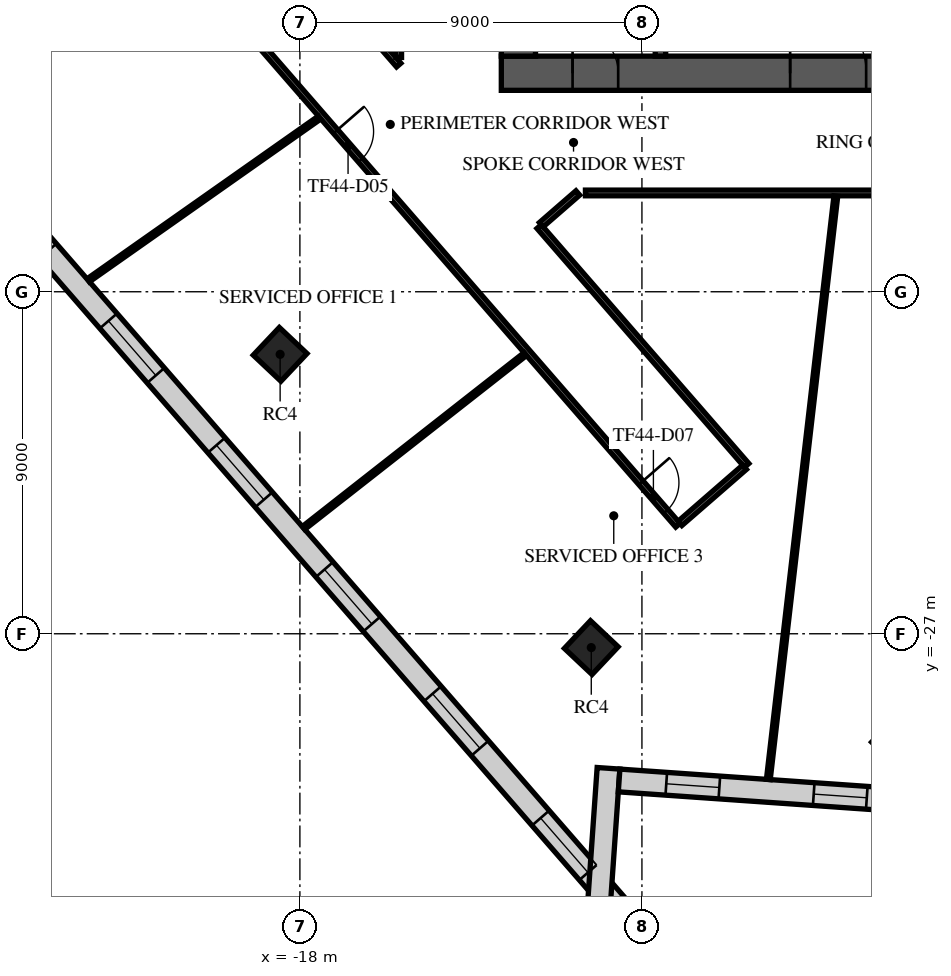
"""IFC4 building model, lengths in metres.
Left out: names, types, materials, properties, quantities, classifications, styles, units other than length and angle.
Written with IfcOpenShell. Run it as: python <this file> out.ifc"""

import sys

from ifc_helpers import new_model, si_unit, direction, frame, frame_2d, origin, origin_2d, place, context, subcontext, project, spatial, rectangle, extrude, element, fill, save


model = new_model("IFC4")
c1 = context("Model", 3, precision=1e-05, world=origin(), true_north=direction((0.0, 1.0)))
c2 = subcontext(c1, "Body", "Model", "MODEL_VIEW")
j1 = project(units=[si_unit("LENGTHUNIT", "METRE"), si_unit("PLANEANGLEUNIT", "RADIAN")], contexts=[c1])
p1 = place(None, origin())
s1 = spatial("IfcSite", under=j1, at=p1, CompositionType="ELEMENT")
p2 = place(p1, origin())
s2 = spatial("IfcBuilding", under=s1, at=p2, CompositionType="ELEMENT")
p3 = place(p2, frame((0.0, 0.0, 193.3)))
s3 = spatial("IfcBuildingStorey", under=s2, at=p3, CompositionType="ELEMENT", Elevation=193.3)
for number, where, z_axis, x_axis in (
    (1, (-18.52, -19.647, 0.0), (0.0, 0.0, 1.0), (0.686, 0.728, 0.0)),
    (2, (-10.333, -27.364, 0.0), (0.0, 0.0, 1.0), (0.686, 0.728, 0.0)),
):
    element("IfcColumn", number, at=place(p3, frame(where, z_axis=z_axis, x_axis=x_axis)), inside=s3, PredefinedType="COLUMN", context=c2, shape_type="SweptSolid", body=[
        extrude(rectangle(XDim=1.0, YDim=1.0, at=origin_2d()), origin(), (0.0, 0.0, 1.0), 4.0),
    ])
p4 = place(p3, frame((-12.7, -12.25, 0.0), z_axis=(0.0, 0.0, 1.0), x_axis=(1.0, 0.0, 0.0)))
e3 = element("IfcWall", 3, at=p4, inside=s3, PredefinedType="SHEAR", context=c2, shape_type="SweptSolid", body=[
    extrude(rectangle(XDim=25.4, YDim=0.9, at=frame_2d((12.7, 0.0))), origin(), (0.0, 0.0, 1.0), 3.62),
])
p5 = place(p4, frame((7.6, 0.0, 0.0)))
e4 = element("IfcOpeningElement", 4, at=p5, cuts=e3, PredefinedType="OPENING", context=c2, shape_type="SweptSolid", body=[
    extrude(rectangle(XDim=2.0, YDim=2.1, at=frame_2d((1.0, 1.05))), frame((0.0, 0.46, 0.0), z_axis=(0.0, -1.0, 0.0), x_axis=(1.0, 0.0, 0.0)), (0.0, 0.0, 1.0), 0.92),
])
p6 = place(p4, frame((17.725, 0.0, 0.0)))
e5 = element("IfcOpeningElement", 5, at=p6, cuts=e3, PredefinedType="OPENING", context=c2, shape_type="SweptSolid", body=[
    extrude(rectangle(XDim=1.2, YDim=2.1, at=frame_2d((0.6, 1.05))), frame((0.0, 0.46, 0.0), z_axis=(0.0, -1.0, 0.0), x_axis=(1.0, 0.0, 0.0)), (0.0, 0.0, 1.0), 0.92),
])
p7 = place(p4, frame((1.875, 0.0, 0.0)))
e6 = element("IfcOpeningElement", 6, at=p7, cuts=e3, PredefinedType="OPENING", context=c2, shape_type="SweptSolid", body=[
    extrude(rectangle(XDim=1.2, YDim=2.1, at=frame_2d((0.6, 1.05))), frame((0.0, 0.46, 0.0), z_axis=(0.0, -1.0, 0.0), x_axis=(1.0, 0.0, 0.0)), (0.0, 0.0, 1.0), 0.92),
])
p8 = place(p4, frame((22.325, 0.0, 0.0)))
e7 = element("IfcOpeningElement", 7, at=p8, cuts=e3, PredefinedType="OPENING", context=c2, shape_type="SweptSolid", body=[
    extrude(rectangle(XDim=1.2, YDim=2.1, at=frame_2d((0.6, 1.05))), frame((0.0, 0.46, 0.0), z_axis=(0.0, -1.0, 0.0), x_axis=(1.0, 0.0, 0.0)), (0.0, 0.0, 1.0), 0.92),
])
p9 = place(p3, frame((-12.25, -11.8, 0.0), z_axis=(0.0, 0.0, 1.0), x_axis=(0.0, 1.0, 0.0)))
e8 = element("IfcWall", 8, at=p9, inside=s3, PredefinedType="SHEAR", context=c2, shape_type="SweptSolid", body=[
    extrude(rectangle(XDim=23.6, YDim=0.9, at=frame_2d((11.8, 0.0))), origin(), (0.0, 0.0, 1.0), 3.62),
])
p10 = place(p9, frame((10.6, 0.0, 0.0)))
e9 = element("IfcOpeningElement", 9, at=p10, cuts=e8, PredefinedType="OPENING", context=c2, shape_type="SweptSolid", body=[
    extrude(rectangle(XDim=2.4, YDim=2.4, at=frame_2d((1.2, 1.2))), frame((0.0, 0.46, 0.0), z_axis=(0.0, -1.0, 0.0), x_axis=(1.0, 0.0, 0.0)), (0.0, 0.0, 1.0), 0.92),
])
p11 = place(p3, frame((-8.512, -4.55, 0.0), z_axis=(0.0, 0.0, 1.0), x_axis=(0.0, -1.0, 0.0)))
e10 = element("IfcWall", 10, at=p11, inside=s3, PredefinedType="SOLIDWALL", context=c2, shape_type="SweptSolid", body=[
    extrude(rectangle(XDim=7.25, YDim=0.275, at=frame_2d((3.625, 0.0))), origin(), (0.0, 0.0, 1.0), 3.62),
])
p12 = place(p11, frame((6.0, 0.0, 0.0)))
e11 = element("IfcOpeningElement", 11, at=p12, cuts=e10, PredefinedType="OPENING", context=c2, shape_type="SweptSolid", body=[
    extrude(rectangle(XDim=1.0, YDim=2.1, at=frame_2d((0.5, 1.05))), frame((0.0, 0.147, 0.0), z_axis=(0.0, -1.0, 0.0), x_axis=(1.0, 0.0, 0.0)), (0.0, 0.0, 1.0), 0.295),
])
p13 = place(p3, frame((-35.208, -4.768, 0.0), z_axis=(0.0, 0.0, 1.0), x_axis=(0.656058749455, -0.754709823219, 0.0)))
e12 = element("IfcWall", 12, at=p13, inside=s3, PredefinedType="STANDARD", context=c2, shape_type="SweptSolid", body=[
    extrude(rectangle(XDim=39.0, YDim=0.6, at=frame_2d((19.5, 0.0))), origin(), (0.0, 0.0, 1.0), 3.62),
])
p14 = place(p13, frame((1.217, 0.0, 0.9)))
e13 = element("IfcOpeningElement", 13, at=p14, cuts=e12, PredefinedType="OPENING", context=c2, shape_type="SweptSolid", body=[
    extrude(rectangle(XDim=1.9, YDim=2.1, at=frame_2d((0.95, 1.05))), frame((0.0, 0.31, 0.0), z_axis=(0.0, -1.0, 0.0), x_axis=(1.0, 0.0, 0.0)), (0.0, 0.0, 1.0), 0.62),
])
p15 = place(p13, frame((5.55, 0.0, 0.9)))
e14 = element("IfcOpeningElement", 14, at=p15, cuts=e12, PredefinedType="OPENING", context=c2, shape_type="SweptSolid", body=[
    extrude(rectangle(XDim=1.9, YDim=2.1, at=frame_2d((0.95, 1.05))), frame((0.0, 0.31, 0.0), z_axis=(0.0, -1.0, 0.0), x_axis=(1.0, 0.0, 0.0)), (0.0, 0.0, 1.0), 0.62),
])
p16 = place(p13, frame((9.883, 0.0, 0.9)))
e15 = element("IfcOpeningElement", 15, at=p16, cuts=e12, PredefinedType="OPENING", context=c2, shape_type="SweptSolid", body=[
    extrude(rectangle(XDim=1.9, YDim=2.1, at=frame_2d((0.95, 1.05))), frame((0.0, 0.31, 0.0), z_axis=(0.0, -1.0, 0.0), x_axis=(1.0, 0.0, 0.0)), (0.0, 0.0, 1.0), 0.62),
])
p17 = place(p13, frame((14.217, 0.0, 0.9)))
e16 = element("IfcOpeningElement", 16, at=p17, cuts=e12, PredefinedType="OPENING", context=c2, shape_type="SweptSolid", body=[
    extrude(rectangle(XDim=1.9, YDim=2.1, at=frame_2d((0.95, 1.05))), frame((0.0, 0.31, 0.0), z_axis=(0.0, -1.0, 0.0), x_axis=(1.0, 0.0, 0.0)), (0.0, 0.0, 1.0), 0.62),
])
p18 = place(p13, frame((18.55, 0.0, 0.9)))
e17 = element("IfcOpeningElement", 17, at=p18, cuts=e12, PredefinedType="OPENING", context=c2, shape_type="SweptSolid", body=[
    extrude(rectangle(XDim=1.9, YDim=2.1, at=frame_2d((0.95, 1.05))), frame((0.0, 0.31, 0.0), z_axis=(0.0, -1.0, 0.0), x_axis=(1.0, 0.0, 0.0)), (0.0, 0.0, 1.0), 0.62),
])
p19 = place(p13, frame((22.883, 0.0, 0.9)))
e18 = element("IfcOpeningElement", 18, at=p19, cuts=e12, PredefinedType="OPENING", context=c2, shape_type="SweptSolid", body=[
    extrude(rectangle(XDim=1.9, YDim=2.1, at=frame_2d((0.95, 1.05))), frame((0.0, 0.31, 0.0), z_axis=(0.0, -1.0, 0.0), x_axis=(1.0, 0.0, 0.0)), (0.0, 0.0, 1.0), 0.62),
])
p20 = place(p13, frame((27.217, 0.0, 0.9)))
e19 = element("IfcOpeningElement", 19, at=p20, cuts=e12, PredefinedType="OPENING", context=c2, shape_type="SweptSolid", body=[
    extrude(rectangle(XDim=1.9, YDim=2.1, at=frame_2d((0.95, 1.05))), frame((0.0, 0.31, 0.0), z_axis=(0.0, -1.0, 0.0), x_axis=(1.0, 0.0, 0.0)), (0.0, 0.0, 1.0), 0.62),
])
p21 = place(p13, frame((31.55, 0.0, 0.9)))
e20 = element("IfcOpeningElement", 20, at=p21, cuts=e12, PredefinedType="OPENING", context=c2, shape_type="SweptSolid", body=[
    extrude(rectangle(XDim=1.9, YDim=2.1, at=frame_2d((0.95, 1.05))), frame((0.0, 0.31, 0.0), z_axis=(0.0, -1.0, 0.0), x_axis=(1.0, 0.0, 0.0)), (0.0, 0.0, 1.0), 0.62),
])
p22 = place(p13, frame((35.883, 0.0, 0.9)))
e21 = element("IfcOpeningElement", 21, at=p22, cuts=e12, PredefinedType="OPENING", context=c2, shape_type="SweptSolid", body=[
    extrude(rectangle(XDim=1.9, YDim=2.1, at=frame_2d((0.95, 1.05))), frame((0.0, 0.31, 0.0), z_axis=(0.0, -1.0, 0.0), x_axis=(1.0, 0.0, 0.0)), (0.0, 0.0, 1.0), 0.62),
])
p23 = place(p3, frame((-10.147, -34.378, 0.0), z_axis=(0.0, 0.0, 1.0), x_axis=(0.069753966021, 0.997564225614, 0.0)))
e22 = element("IfcWall", 22, at=p23, inside=s3, PredefinedType="STANDARD", context=c2, shape_type="SweptSolid", body=[
    extrude(rectangle(XDim=3.846, YDim=0.6, at=frame_2d((1.923, 0.0))), origin(), (0.0, 0.0, 1.0), 3.62),
])
p24 = place(p3, frame((-9.601, -30.861, 0.0), z_axis=(0.0, 0.0, 1.0), x_axis=(0.997564801601, -0.069745728239, 0.0)))
e23 = element("IfcWall", 23, at=p24, inside=s3, PredefinedType="STANDARD", context=c2, shape_type="SweptSolid", body=[
    extrude(rectangle(XDim=7.778, YDim=0.6, at=frame_2d((3.889, 0.0))), origin(), (0.0, 0.0, 1.0), 3.62),
])
p25 = place(p24, frame((1.244, 0.0, 0.9)))
e24 = element("IfcOpeningElement", 24, at=p25, cuts=e23, PredefinedType="OPENING", context=c2, shape_type="SweptSolid", body=[
    extrude(rectangle(XDim=1.4, YDim=2.1, at=frame_2d((0.7, 1.05))), frame((0.0, 0.31, 0.0), z_axis=(0.0, -1.0, 0.0), x_axis=(1.0, 0.0, 0.0)), (0.0, 0.0, 1.0), 0.62),
])
p26 = place(p24, frame((5.134, 0.0, 0.9)))
e25 = element("IfcOpeningElement", 25, at=p26, cuts=e23, PredefinedType="OPENING", context=c2, shape_type="SweptSolid", body=[
    extrude(rectangle(XDim=1.4, YDim=2.1, at=frame_2d((0.7, 1.05))), frame((0.0, 0.31, 0.0), z_axis=(0.0, -1.0, 0.0), x_axis=(1.0, 0.0, 0.0)), (0.0, 0.0, 1.0), 0.62),
])
p27 = place(p3, frame((-24.98, -4.673, 0.0), z_axis=(0.0, 0.0, 1.0), x_axis=(0.656048444225, -0.754718781289, 0.0)))
e26 = element("IfcWall", 26, at=p27, inside=s3, PredefinedType="PARTITIONING", context=c2, shape_type="SweptSolid", body=[
    extrude(rectangle(XDim=25.8, YDim=0.15, at=frame_2d((12.9, 0.0))), origin(), (0.0, 0.0, 1.0), 3.17),
])
p28 = place(p27, frame((12.071, 0.0, 0.0)))
e27 = element("IfcOpeningElement", 27, at=p28, cuts=e26, PredefinedType="OPENING", context=c2, shape_type="SweptSolid", body=[
    extrude(rectangle(XDim=1.0, YDim=2.1, at=frame_2d((0.5, 1.05))), frame((0.0, 0.085, 0.0), z_axis=(0.0, -1.0, 0.0), x_axis=(1.0, 0.0, 0.0)), (0.0, 0.0, 1.0), 0.17),
])
p29 = place(p27, frame((24.318, 0.0, 0.0)))
e28 = element("IfcOpeningElement", 28, at=p29, cuts=e26, PredefinedType="OPENING", context=c2, shape_type="SweptSolid", body=[
    extrude(rectangle(XDim=1.0, YDim=2.1, at=frame_2d((0.5, 1.05))), frame((0.0, 0.085, 0.0), z_axis=(0.0, -1.0, 0.0), x_axis=(1.0, 0.0, 0.0)), (0.0, 0.0, 1.0), 0.17),
])
p30 = place(p3, frame((-23.169, -3.098, 0.0), z_axis=(0.0, 0.0, 1.0), x_axis=(0.656047525283, -0.754719580089, 0.0)))
e29 = element("IfcWall", 29, at=p30, inside=s3, PredefinedType="PARTITIONING", context=c2, shape_type="SweptSolid", body=[
    extrude(rectangle(XDim=11.842, YDim=0.15, at=frame_2d((5.921, 0.0))), origin(), (0.0, 0.0, 1.0), 3.17),
])
p31 = place(p30, frame((2.8, 0.0, 0.0)))
e30 = element("IfcOpeningElement", 30, at=p31, cuts=e29, PredefinedType="OPENING", context=c2, shape_type="SweptSolid", body=[
    extrude(rectangle(XDim=1.8, YDim=2.1, at=frame_2d((0.9, 1.05))), frame((0.0, 0.085, 0.0), z_axis=(0.0, -1.0, 0.0), x_axis=(1.0, 0.0, 0.0)), (0.0, 0.0, 1.0), 0.17),
])
p32 = place(p30, frame((7.55, 0.0, 0.0)))
e31 = element("IfcOpeningElement", 31, at=p32, cuts=e29, PredefinedType="OPENING", context=c2, shape_type="SweptSolid", body=[
    extrude(rectangle(XDim=1.0, YDim=2.1, at=frame_2d((0.5, 1.05))), frame((0.0, 0.085, 0.0), z_axis=(0.0, -1.0, 0.0), x_axis=(1.0, 0.0, 0.0)), (0.0, 0.0, 1.0), 0.17),
])
p33 = place(p3, frame((-15.4, -11.834, 0.0), z_axis=(0.0, 0.0, 1.0), x_axis=(0.0, 1.0, 0.0)))
e32 = element("IfcWall", 32, at=p33, inside=s3, PredefinedType="PARTITIONING", context=c2, shape_type="SweptSolid", body=[
    extrude(rectangle(XDim=20.666, YDim=0.15, at=frame_2d((10.333, 0.0))), origin(), (0.0, 0.0, 1.0), 3.17),
])
p34 = place(p3, frame((-11.705, -16.285, 0.0), z_axis=(0.0, 0.0, 1.0), x_axis=(0.656018266208, -0.754745012837, 0.0)))
e33 = element("IfcWall", 33, at=p34, inside=s3, PredefinedType="PARTITIONING", context=c2, shape_type="SweptSolid", body=[
    extrude(rectangle(XDim=8.326, YDim=0.15, at=frame_2d((4.163, 0.0))), origin(), (0.0, 0.0, 1.0), 3.17),
])
p35 = place(p3, frame((-11.648, -16.236, 0.0), z_axis=(0.0, 0.0, 1.0), x_axis=(0.754638525281, 0.656140759412, 0.0)))
e34 = element("IfcWall", 34, at=p35, inside=s3, PredefinedType="PARTITIONING", context=c2, shape_type="SweptSolid", body=[
    extrude(rectangle(XDim=1.274, YDim=0.15, at=frame_2d((0.637, 0.0))), origin(), (0.0, 0.0, 1.0), 3.17),
])
p36 = place(p3, frame((-10.486, -15.4, 0.0), z_axis=(0.0, 0.0, 1.0), x_axis=(1.0, 0.0, 0.0)))
e35 = element("IfcWall", 35, at=p36, inside=s3, PredefinedType="PARTITIONING", context=c2, shape_type="SweptSolid", body=[
    extrude(rectangle(XDim=17.763, YDim=0.15, at=frame_2d((8.882, 0.0))), origin(), (0.0, 0.0, 1.0), 3.17),
])
p37 = place(p36, frame((14.154, 0.0, 0.0)))
e36 = element("IfcOpeningElement", 36, at=p37, cuts=e35, PredefinedType="OPENING", context=c2, shape_type="SweptSolid", body=[
    extrude(rectangle(XDim=1.0, YDim=2.1, at=frame_2d((0.5, 1.05))), frame((0.0, 0.085, 0.0), z_axis=(0.0, -1.0, 0.0), x_axis=(1.0, 0.0, 0.0)), (0.0, 0.0, 1.0), 0.17),
])
p38 = place(p3, frame((-7.997, -24.095, 0.0), z_axis=(0.0, 0.0, 1.0), x_axis=(0.754549456123, 0.656243185308, 0.0)))
e37 = element("IfcWall", 37, at=p38, inside=s3, PredefinedType="PARTITIONING", context=c2, shape_type="SweptSolid", body=[
    extrude(rectangle(XDim=2.25, YDim=0.15, at=frame_2d((1.125, 0.0))), origin(), (0.0, 0.0, 1.0), 3.17),
])
p39 = place(p3, frame((-23.568, -17.698, 0.0), z_axis=(0.0, 0.0, 1.0), x_axis=(0.817824726915, 0.575467389212, 0.0)))
e38 = element("IfcWall", 38, at=p39, inside=s3, PredefinedType="PARTITIONING", context=c2, shape_type="SweptSolid", body=[
    extrude(rectangle(XDim=7.438, YDim=0.1, at=frame_2d((3.719, 0.0))), origin(), (0.0, 0.0, 1.0), 3.17),
])
p40 = place(p3, frame((-17.903, -24.215, 0.0), z_axis=(0.0, 0.0, 1.0), x_axis=(0.786835853262, 0.617162328744, 0.0)))
e39 = element("IfcWall", 39, at=p40, inside=s3, PredefinedType="PARTITIONING", context=c2, shape_type="SweptSolid", body=[
    extrude(rectangle(XDim=7.412, YDim=0.1, at=frame_2d((3.706, 0.0))), origin(), (0.0, 0.0, 1.0), 3.17),
])
p41 = place(p3, frame((-5.674, -30.833, 0.0), z_axis=(0.0, 0.0, 1.0), x_axis=(0.114957483757, 0.993370412751, 0.0)))
e40 = element("IfcWall", 40, at=p41, inside=s3, PredefinedType="PARTITIONING", context=c2, shape_type="SweptSolid", body=[
    extrude(rectangle(XDim=15.455, YDim=0.1, at=frame_2d((7.727, 0.0))), origin(), (0.0, 0.0, 1.0), 3.62),
])
p42 = place(p5, origin())
e41 = element("IfcDoor", 41, at=p42, inside=s3, OperationType="SINGLE_SWING_LEFT", PredefinedType="DOOR", context=c2, shape_type="SweptSolid", body=[
    extrude(rectangle(XDim=2.0, YDim=2.1, at=frame_2d((1.0, 1.05))), frame((0.0, 0.025, 0.0), z_axis=(0.0, -1.0, 0.0), x_axis=(1.0, 0.0, 0.0)), (0.0, 0.0, 1.0), 0.05),
])
fill(e4, e41)
p43 = place(p7, origin())
e42 = element("IfcDoor", 42, at=p43, inside=s3, OperationType="SINGLE_SWING_LEFT", PredefinedType="DOOR", context=c2, shape_type="SweptSolid", body=[
    extrude(rectangle(XDim=1.2, YDim=2.1, at=frame_2d((0.6, 1.05))), frame((0.0, 0.025, 0.0), z_axis=(0.0, -1.0, 0.0), x_axis=(1.0, 0.0, 0.0)), (0.0, 0.0, 1.0), 0.05),
])
fill(e6, e42)
p44 = place(p18, origin())
e43 = element("IfcWindow", 43, at=p44, inside=s3, PartitioningType="SINGLE_PANEL", PredefinedType="WINDOW", context=c2, shape_type="SweptSolid", body=[
    extrude(rectangle(XDim=1.9, YDim=2.1, at=frame_2d((0.95, 1.05))), frame((0.0, 0.03, 0.0), z_axis=(0.0, -1.0, 0.0), x_axis=(1.0, 0.0, 0.0)), (0.0, 0.0, 1.0), 0.06),
])
fill(e17, e43)
p45 = place(p19, origin())
e44 = element("IfcWindow", 44, at=p45, inside=s3, PartitioningType="SINGLE_PANEL", PredefinedType="WINDOW", context=c2, shape_type="SweptSolid", body=[
    extrude(rectangle(XDim=1.9, YDim=2.1, at=frame_2d((0.95, 1.05))), frame((0.0, 0.03, 0.0), z_axis=(0.0, -1.0, 0.0), x_axis=(1.0, 0.0, 0.0)), (0.0, 0.0, 1.0), 0.06),
])
fill(e18, e44)
p46 = place(p20, origin())
e45 = element("IfcWindow", 45, at=p46, inside=s3, PartitioningType="SINGLE_PANEL", PredefinedType="WINDOW", context=c2, shape_type="SweptSolid", body=[
    extrude(rectangle(XDim=1.9, YDim=2.1, at=frame_2d((0.95, 1.05))), frame((0.0, 0.03, 0.0), z_axis=(0.0, -1.0, 0.0), x_axis=(1.0, 0.0, 0.0)), (0.0, 0.0, 1.0), 0.06),
])
fill(e19, e45)
p47 = place(p21, origin())
e46 = element("IfcWindow", 46, at=p47, inside=s3, PartitioningType="SINGLE_PANEL", PredefinedType="WINDOW", context=c2, shape_type="SweptSolid", body=[
    extrude(rectangle(XDim=1.9, YDim=2.1, at=frame_2d((0.95, 1.05))), frame((0.0, 0.03, 0.0), z_axis=(0.0, -1.0, 0.0), x_axis=(1.0, 0.0, 0.0)), (0.0, 0.0, 1.0), 0.06),
])
fill(e20, e46)
p48 = place(p22, origin())
e47 = element("IfcWindow", 47, at=p48, inside=s3, PartitioningType="SINGLE_PANEL", PredefinedType="WINDOW", context=c2, shape_type="SweptSolid", body=[
    extrude(rectangle(XDim=1.9, YDim=2.1, at=frame_2d((0.95, 1.05))), frame((0.0, 0.03, 0.0), z_axis=(0.0, -1.0, 0.0), x_axis=(1.0, 0.0, 0.0)), (0.0, 0.0, 1.0), 0.06),
])
fill(e21, e47)
p49 = place(p25, origin())
e48 = element("IfcWindow", 48, at=p49, inside=s3, PartitioningType="SINGLE_PANEL", PredefinedType="WINDOW", context=c2, shape_type="SweptSolid", body=[
    extrude(rectangle(XDim=1.4, YDim=2.1, at=frame_2d((0.7, 1.05))), frame((0.0, 0.03, 0.0), z_axis=(0.0, -1.0, 0.0), x_axis=(1.0, 0.0, 0.0)), (0.0, 0.0, 1.0), 0.06),
])
fill(e24, e48)
p50 = place(p26, origin())
e49 = element("IfcWindow", 49, at=p50, inside=s3, PartitioningType="SINGLE_PANEL", PredefinedType="WINDOW", context=c2, shape_type="SweptSolid", body=[
    extrude(rectangle(XDim=1.4, YDim=2.1, at=frame_2d((0.7, 1.05))), frame((0.0, 0.03, 0.0), z_axis=(0.0, -1.0, 0.0), x_axis=(1.0, 0.0, 0.0)), (0.0, 0.0, 1.0), 0.06),
])
fill(e25, e49)
p51 = place(p28, frame((1.0, 0.0, 0.0), z_axis=(0.0, 0.0, 1.0), x_axis=(-1.0, 0.0, 0.0)))
e50 = element("IfcDoor", 50, at=p51, inside=s3, OperationType="SINGLE_SWING_LEFT", PredefinedType="DOOR", context=c2, shape_type="SweptSolid", body=[
    extrude(rectangle(XDim=1.0, YDim=2.1, at=frame_2d((0.5, 1.05))), frame((0.0, 0.025, 0.0), z_axis=(0.0, -1.0, 0.0), x_axis=(1.0, 0.0, 0.0)), (0.0, 0.0, 1.0), 0.05),
])
fill(e27, e50)
p52 = place(p29, frame((1.0, 0.0, 0.0), z_axis=(0.0, 0.0, 1.0), x_axis=(-1.0, 0.0, 0.0)))
e51 = element("IfcDoor", 51, at=p52, inside=s3, OperationType="SINGLE_SWING_LEFT", PredefinedType="DOOR", context=c2, shape_type="SweptSolid", body=[
    extrude(rectangle(XDim=1.0, YDim=2.1, at=frame_2d((0.5, 1.05))), frame((0.0, 0.025, 0.0), z_axis=(0.0, -1.0, 0.0), x_axis=(1.0, 0.0, 0.0)), (0.0, 0.0, 1.0), 0.05),
])
fill(e28, e51)
save(model, sys.argv[1])
